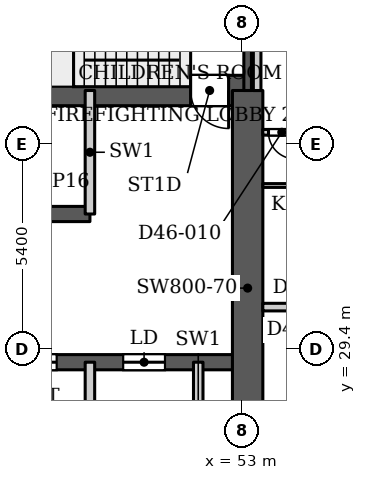
"""IFC4 building model, lengths in metres.
Left out: names, types, materials, properties, quantities, classifications, styles, units other than length and angle.
Written with IfcOpenShell. Run it as: python <this file> out.ifc"""

import sys

from ifc_helpers import new_model, si_unit, direction, frame, frame_2d, origin, place, context, subcontext, project, spatial, rectangle, extrude, source, transform, mapped, element, fill, save


model = new_model("IFC4")
c1 = context("Model", 3, precision=1e-05, world=origin(), true_north=direction((0.0, 1.0)))
c2 = subcontext(c1, "Body", "Model", "MODEL_VIEW")
j1 = project(units=[si_unit("LENGTHUNIT", "METRE"), si_unit("PLANEANGLEUNIT", "RADIAN")], contexts=[c1])
p1 = place(None, origin())
s1 = spatial("IfcSite", under=j1, at=p1, CompositionType="ELEMENT")
p2 = place(p1, origin())
s2 = spatial("IfcBuilding", under=s1, at=p2, CompositionType="ELEMENT")
p3 = place(p2, frame((0.0, 0.0, 195.5)))
s3 = spatial("IfcBuildingStorey", under=s2, at=p3, CompositionType="ELEMENT", Elevation=195.5)
p4 = place(p3, frame((34.75, 29.05, 0.0), z_axis=(0.0, 0.0, 1.0), x_axis=(1.0, 0.0, 0.0)))
e1 = element("IfcWall", 1, at=p4, inside=s3, PredefinedType="SHEAR", context=c2, shape_type="SweptSolid", body=[
    extrude(rectangle(XDim=18.4, YDim=0.4, at=frame_2d((9.2, 0.0))), origin(), (0.0, 0.0, 1.0), 3.9),
])
p5 = place(p4, frame((0.875, 0.0, 0.0)))
e2 = element("IfcOpeningElement", 2, at=p5, cuts=e1, PredefinedType="OPENING", context=c2, shape_type="SweptSolid", body=[
    extrude(rectangle(XDim=1.1, YDim=2.2, at=frame_2d((0.55, 1.1))), frame((0.0, 0.21, 0.0), z_axis=(0.0, -1.0, 0.0), x_axis=(1.0, 0.0, 0.0)), (0.0, 0.0, 1.0), 0.42),
])
p6 = place(p4, frame((3.725, 0.0, 0.0)))
e3 = element("IfcOpeningElement", 3, at=p6, cuts=e1, PredefinedType="OPENING", context=c2, shape_type="SweptSolid", body=[
    extrude(rectangle(XDim=1.1, YDim=2.2, at=frame_2d((0.55, 1.1))), frame((0.0, 0.21, 0.0), z_axis=(0.0, -1.0, 0.0), x_axis=(1.0, 0.0, 0.0)), (0.0, 0.0, 1.0), 0.42),
])
p7 = place(p4, frame((6.575, 0.0, 0.0)))
e4 = element("IfcOpeningElement", 4, at=p7, cuts=e1, PredefinedType="OPENING", context=c2, shape_type="SweptSolid", body=[
    extrude(rectangle(XDim=1.1, YDim=2.2, at=frame_2d((0.55, 1.1))), frame((0.0, 0.21, 0.0), z_axis=(0.0, -1.0, 0.0), x_axis=(1.0, 0.0, 0.0)), (0.0, 0.0, 1.0), 0.42),
])
p8 = place(p4, frame((9.425, 0.0, 0.0)))
e5 = element("IfcOpeningElement", 5, at=p8, cuts=e1, PredefinedType="OPENING", context=c2, shape_type="SweptSolid", body=[
    extrude(rectangle(XDim=1.1, YDim=2.2, at=frame_2d((0.55, 1.1))), frame((0.0, 0.21, 0.0), z_axis=(0.0, -1.0, 0.0), x_axis=(1.0, 0.0, 0.0)), (0.0, 0.0, 1.0), 0.42),
])
p9 = place(p4, frame((12.275, 0.0, 0.0)))
e6 = element("IfcOpeningElement", 6, at=p9, cuts=e1, PredefinedType="OPENING", context=c2, shape_type="SweptSolid", body=[
    extrude(rectangle(XDim=1.1, YDim=2.2, at=frame_2d((0.55, 1.1))), frame((0.0, 0.21, 0.0), z_axis=(0.0, -1.0, 0.0), x_axis=(1.0, 0.0, 0.0)), (0.0, 0.0, 1.0), 0.42),
])
p10 = place(p4, frame((15.125, 0.0, 0.0)))
e7 = element("IfcOpeningElement", 7, at=p10, cuts=e1, PredefinedType="OPENING", context=c2, shape_type="SweptSolid", body=[
    extrude(rectangle(XDim=1.1, YDim=2.2, at=frame_2d((0.55, 1.1))), frame((0.0, 0.21, 0.0), z_axis=(0.0, -1.0, 0.0), x_axis=(1.0, 0.0, 0.0)), (0.0, 0.0, 1.0), 0.42),
])
p11 = place(p3, frame((34.75, 32.95, 0.0), z_axis=(0.0, 0.0, 1.0), x_axis=(1.0, 0.0, 0.0)))
e8 = element("IfcWall", 8, at=p11, inside=s3, PredefinedType="SHEAR", context=c2, shape_type="SweptSolid", body=[
    extrude(rectangle(XDim=14.25, YDim=0.4, at=frame_2d((7.125, 0.0))), origin(), (0.0, 0.0, 1.0), 3.9),
])
p12 = place(p3, frame((34.75, 36.2, 0.0), z_axis=(0.0, 0.0, 1.0), x_axis=(1.0, 0.0, 0.0)))
e9 = element("IfcWall", 9, at=p12, inside=s3, PredefinedType="SHEAR", context=c2, shape_type="SweptSolid", body=[
    extrude(rectangle(XDim=18.4, YDim=0.8, at=frame_2d((9.2, 0.0))), origin(), (0.0, 0.0, 1.0), 3.9),
])
p13 = place(p12, frame((16.9, 0.0, 0.0)))
e10 = element("IfcOpeningElement", 10, at=p13, cuts=e9, PredefinedType="OPENING", context=c2, shape_type="SweptSolid", body=[
    extrude(rectangle(XDim=1.0, YDim=2.2, at=frame_2d((0.5, 1.1))), frame((0.0, 0.41, 0.0), z_axis=(0.0, -1.0, 0.0), x_axis=(1.0, 0.0, 0.0)), (0.0, 0.0, 1.0), 0.82),
])
p14 = place(p3, frame((53.15, 25.8, 0.0), z_axis=(0.0, 0.0, 1.0), x_axis=(0.0, 1.0, 0.0)))
e11 = element("IfcWall", 11, at=p14, inside=s3, PredefinedType="SHEAR", context=c2, shape_type="SweptSolid", body=[
    extrude(rectangle(XDim=10.4, YDim=0.8, at=frame_2d((5.2, 0.0))), origin(), (0.0, 0.0, 1.0), 3.9),
])
p15 = place(p3, frame((53.15, 36.2, 0.0), z_axis=(0.0, 0.0, 1.0), x_axis=(0.0, 1.0, 0.0)))
e12 = element("IfcWall", 12, at=p15, inside=s3, PredefinedType="SHEAR", context=c2, shape_type="SweptSolid", body=[
    extrude(rectangle(XDim=3.15, YDim=0.2, at=frame_2d((1.575, 0.0))), origin(), (0.0, 0.0, 1.0), 3.9),
])
for number, where, z_axis, x_axis in (
    (13, (49.0, 25.8, 0.0), (0.0, 0.0, 1.0), (0.0, 1.0, 0.0)),
    (14, (49.0, 32.95, 0.0), (0.0, 0.0, 1.0), (0.0, 1.0, 0.0)),
    (15, (51.85, 25.8, 0.0), (0.0, 0.0, 1.0), (0.0, 1.0, 0.0)),
):
    element("IfcWall", number, at=place(p3, frame(where, z_axis=z_axis, x_axis=x_axis)), inside=s3, PredefinedType="PARTITIONING", context=c2, shape_type="SweptSolid", body=[
        extrude(rectangle(XDim=3.25, YDim=0.25, at=frame_2d((1.625, 0.0))), origin(), (0.0, 0.0, 1.0), 3.9),
    ])
p16 = place(p3, frame((53.4, 36.199, 0.0), z_axis=(0.0, 0.0, 1.0), x_axis=(0.0, 1.0, 0.0)))
e16 = element("IfcWall", 16, at=p16, inside=s3, PredefinedType="PARTITIONING", context=c2, shape_type="SweptSolid", body=[
    extrude(rectangle(XDim=7.701, YDim=0.2, at=frame_2d((3.851, 0.0))), origin(), (0.0, 0.0, 1.0), 3.6),
])
p17 = place(p3, frame((53.549, 30.5, 0.0), z_axis=(0.0, 0.0, 1.0), x_axis=(1.0, 0.0, 0.0)))
e17 = element("IfcWall", 17, at=p17, inside=s3, PredefinedType="PARTITIONING", context=c2, shape_type="SweptSolid", body=[
    extrude(rectangle(XDim=44.551, YDim=0.2, at=frame_2d((22.275, 0.0))), origin(), (0.0, 0.0, 1.0), 3.6),
])
p18 = place(p17, frame((5.501, 0.0, 0.0)))
e18 = element("IfcOpeningElement", 18, at=p18, cuts=e17, PredefinedType="OPENING", context=c2, shape_type="SweptSolid", body=[
    extrude(rectangle(XDim=1.0, YDim=2.1, at=frame_2d((0.5, 1.05))), frame((0.0, 0.11, 0.0), z_axis=(0.0, -1.0, 0.0), x_axis=(1.0, 0.0, 0.0)), (0.0, 0.0, 1.0), 0.22),
])
p19 = place(p17, frame((20.201, 0.0, 0.0)))
e19 = element("IfcOpeningElement", 19, at=p19, cuts=e17, PredefinedType="OPENING", context=c2, shape_type="SweptSolid", body=[
    extrude(rectangle(XDim=1.0, YDim=2.1, at=frame_2d((0.5, 1.05))), frame((0.0, 0.11, 0.0), z_axis=(0.0, -1.0, 0.0), x_axis=(1.0, 0.0, 0.0)), (0.0, 0.0, 1.0), 0.22),
])
p20 = place(p17, frame((24.251, 0.0, 0.0)))
e20 = element("IfcOpeningElement", 20, at=p20, cuts=e17, PredefinedType="OPENING", context=c2, shape_type="SweptSolid", body=[
    extrude(rectangle(XDim=1.0, YDim=2.1, at=frame_2d((0.5, 1.05))), frame((0.0, 0.11, 0.0), z_axis=(0.0, -1.0, 0.0), x_axis=(1.0, 0.0, 0.0)), (0.0, 0.0, 1.0), 0.22),
])
p21 = place(p17, frame((40.151, 0.0, 0.0)))
e21 = element("IfcOpeningElement", 21, at=p21, cuts=e17, PredefinedType="OPENING", context=c2, shape_type="SweptSolid", body=[
    extrude(rectangle(XDim=1.0, YDim=2.1, at=frame_2d((0.5, 1.05))), frame((0.0, 0.11, 0.0), z_axis=(0.0, -1.0, 0.0), x_axis=(1.0, 0.0, 0.0)), (0.0, 0.0, 1.0), 0.22),
])
p22 = place(p3, frame((53.549, 33.7, 0.0), z_axis=(0.0, 0.0, 1.0), x_axis=(1.0, 0.0, 0.0)))
e22 = element("IfcWall", 22, at=p22, inside=s3, PredefinedType="PARTITIONING", context=c2, shape_type="SweptSolid", body=[
    extrude(rectangle(XDim=5.001, YDim=0.1, at=frame_2d((2.5, 0.0))), origin(), (0.0, 0.0, 1.0), 3.6),
])
p23 = place(p22, frame((0.751, 0.0, 0.0)))
e23 = element("IfcOpeningElement", 23, at=p23, cuts=e22, PredefinedType="OPENING", context=c2, shape_type="SweptSolid", body=[
    extrude(rectangle(XDim=0.9, YDim=2.1, at=frame_2d((0.45, 1.05))), frame((0.0, 0.06, 0.0), z_axis=(0.0, -1.0, 0.0), x_axis=(1.0, 0.0, 0.0)), (0.0, 0.0, 1.0), 0.12),
])
p24 = place(p22, frame((3.651, 0.0, 0.0)))
e24 = element("IfcOpeningElement", 24, at=p24, cuts=e22, PredefinedType="OPENING", context=c2, shape_type="SweptSolid", body=[
    extrude(rectangle(XDim=0.8, YDim=2.1, at=frame_2d((0.4, 1.05))), frame((0.0, 0.06, 0.0), z_axis=(0.0, -1.0, 0.0), x_axis=(1.0, 0.0, 0.0)), (0.0, 0.0, 1.0), 0.12),
])
p25 = place(p3, frame((53.549, 35.1, 0.0), z_axis=(0.0, 0.0, 1.0), x_axis=(1.0, 0.0, 0.0)))
e25 = element("IfcWall", 25, at=p25, inside=s3, PredefinedType="PARTITIONING", context=c2, shape_type="SweptSolid", body=[
    extrude(rectangle(XDim=13.551, YDim=0.15, at=frame_2d((6.775, 0.0))), origin(), (0.0, 0.0, 1.0), 3.6),
])
p26 = place(p25, frame((3.901, 0.0, 0.0)))
e26 = element("IfcOpeningElement", 26, at=p26, cuts=e25, PredefinedType="OPENING", context=c2, shape_type="SweptSolid", body=[
    extrude(rectangle(XDim=0.9, YDim=2.1, at=frame_2d((0.45, 1.05))), frame((0.0, 0.085, 0.0), z_axis=(0.0, -1.0, 0.0), x_axis=(1.0, 0.0, 0.0)), (0.0, 0.0, 1.0), 0.17),
])
p27 = place(p25, frame((8.701, 0.0, 0.0)))
e27 = element("IfcOpeningElement", 27, at=p27, cuts=e25, PredefinedType="OPENING", context=c2, shape_type="SweptSolid", body=[
    extrude(rectangle(XDim=0.9, YDim=2.1, at=frame_2d((0.45, 1.05))), frame((0.0, 0.085, 0.0), z_axis=(0.0, -1.0, 0.0), x_axis=(1.0, 0.0, 0.0)), (0.0, 0.0, 1.0), 0.17),
])
p28 = place(p25, frame((11.501, 0.0, 0.0)))
e28 = element("IfcOpeningElement", 28, at=p28, cuts=e25, PredefinedType="OPENING", context=c2, shape_type="SweptSolid", body=[
    extrude(rectangle(XDim=1.0, YDim=2.1, at=frame_2d((0.5, 1.05))), frame((0.0, 0.085, 0.0), z_axis=(0.0, -1.0, 0.0), x_axis=(1.0, 0.0, 0.0)), (0.0, 0.0, 1.0), 0.17),
])
p29 = place(p25, frame((6.301, 0.0, 0.0)))
e29 = element("IfcOpeningElement", 29, at=p29, cuts=e25, PredefinedType="OPENING", context=c2, shape_type="SweptSolid", body=[
    extrude(rectangle(XDim=0.9, YDim=2.1, at=frame_2d((0.45, 1.05))), frame((0.0, 0.085, 0.0), z_axis=(0.0, -1.0, 0.0), x_axis=(1.0, 0.0, 0.0)), (0.0, 0.0, 1.0), 0.17),
])
p30 = place(p25, frame((0.15, 0.0, 0.0)))
e30 = element("IfcOpeningElement", 30, at=p30, cuts=e25, PredefinedType="OPENING", context=c2, shape_type="SweptSolid", body=[
    extrude(rectangle(XDim=0.7, YDim=2.1, at=frame_2d((0.35, 1.05))), frame((0.0, 0.085, 0.0), z_axis=(0.0, -1.0, 0.0), x_axis=(1.0, 0.0, 0.0)), (0.0, 0.0, 1.0), 0.17),
])
m1 = source(origin(), c2, "Body", "SweptSolid", [
    extrude(rectangle(XDim=1.1, YDim=2.2, at=frame_2d((0.55, 1.1))), frame((0.0, 0.025, 0.0), z_axis=(0.0, -1.0, 0.0), x_axis=(1.0, 0.0, 0.0)), (0.0, 0.0, 1.0), 0.05),
])
p31 = place(p9, origin())
e31 = element("IfcDoor", 31, at=p31, inside=s3, OperationType="SLIDING_TO_LEFT", PredefinedType="DOOR", context=c2, shape_type="MappedRepresentation", body=[
    mapped(m1, transform((0.0, 0.0, 0.0), x_axis=(1.0, 0.0, 0.0), y_axis=(0.0, 1.0, 0.0), z_axis=(0.0, 0.0, 1.0), scale=1.0)),
])
fill(e6, e31)
p32 = place(p10, origin())
e32 = element("IfcDoor", 32, at=p32, inside=s3, OperationType="SLIDING_TO_LEFT", PredefinedType="DOOR", context=c2, shape_type="MappedRepresentation", body=[
    mapped(m1, transform((0.0, 0.0, 0.0), x_axis=(1.0, 0.0, 0.0), y_axis=(0.0, 1.0, 0.0), z_axis=(0.0, 0.0, 1.0), scale=1.0)),
])
fill(e7, e32)
m2 = source(origin(), c2, "Body", "SweptSolid", [
    extrude(rectangle(XDim=1.0, YDim=2.2, at=frame_2d((0.5, 1.1))), frame((0.0, 0.025, 0.0), z_axis=(0.0, -1.0, 0.0), x_axis=(1.0, 0.0, 0.0)), (0.0, 0.0, 1.0), 0.05),
])
p33 = place(p13, origin())
e33 = element("IfcDoor", 33, at=p33, inside=s3, OperationType="SINGLE_SWING_RIGHT", PredefinedType="DOOR", context=c2, shape_type="MappedRepresentation", body=[
    mapped(m2, transform((0.0, 0.0, 0.0), x_axis=(1.0, 0.0, 0.0), y_axis=(0.0, 1.0, 0.0), z_axis=(0.0, 0.0, 1.0), scale=1.0)),
])
fill(e10, e33)
m3 = source(origin(), c2, "Body", "SweptSolid", [
    extrude(rectangle(XDim=0.7, YDim=2.1, at=frame_2d((0.35, 1.05))), frame((0.0, 0.025, 0.0), z_axis=(0.0, -1.0, 0.0), x_axis=(1.0, 0.0, 0.0)), (0.0, 0.0, 1.0), 0.05),
])
p34 = place(p30, origin())
e34 = element("IfcDoor", 34, at=p34, inside=s3, OperationType="SINGLE_SWING_RIGHT", PredefinedType="DOOR", context=c2, shape_type="MappedRepresentation", body=[
    mapped(m3, transform((0.0, 0.0, 0.0), x_axis=(1.0, 0.0, 0.0), y_axis=(0.0, 1.0, 0.0), z_axis=(0.0, 0.0, 1.0), scale=1.0)),
])
fill(e30, e34)
save(model, sys.argv[1])
